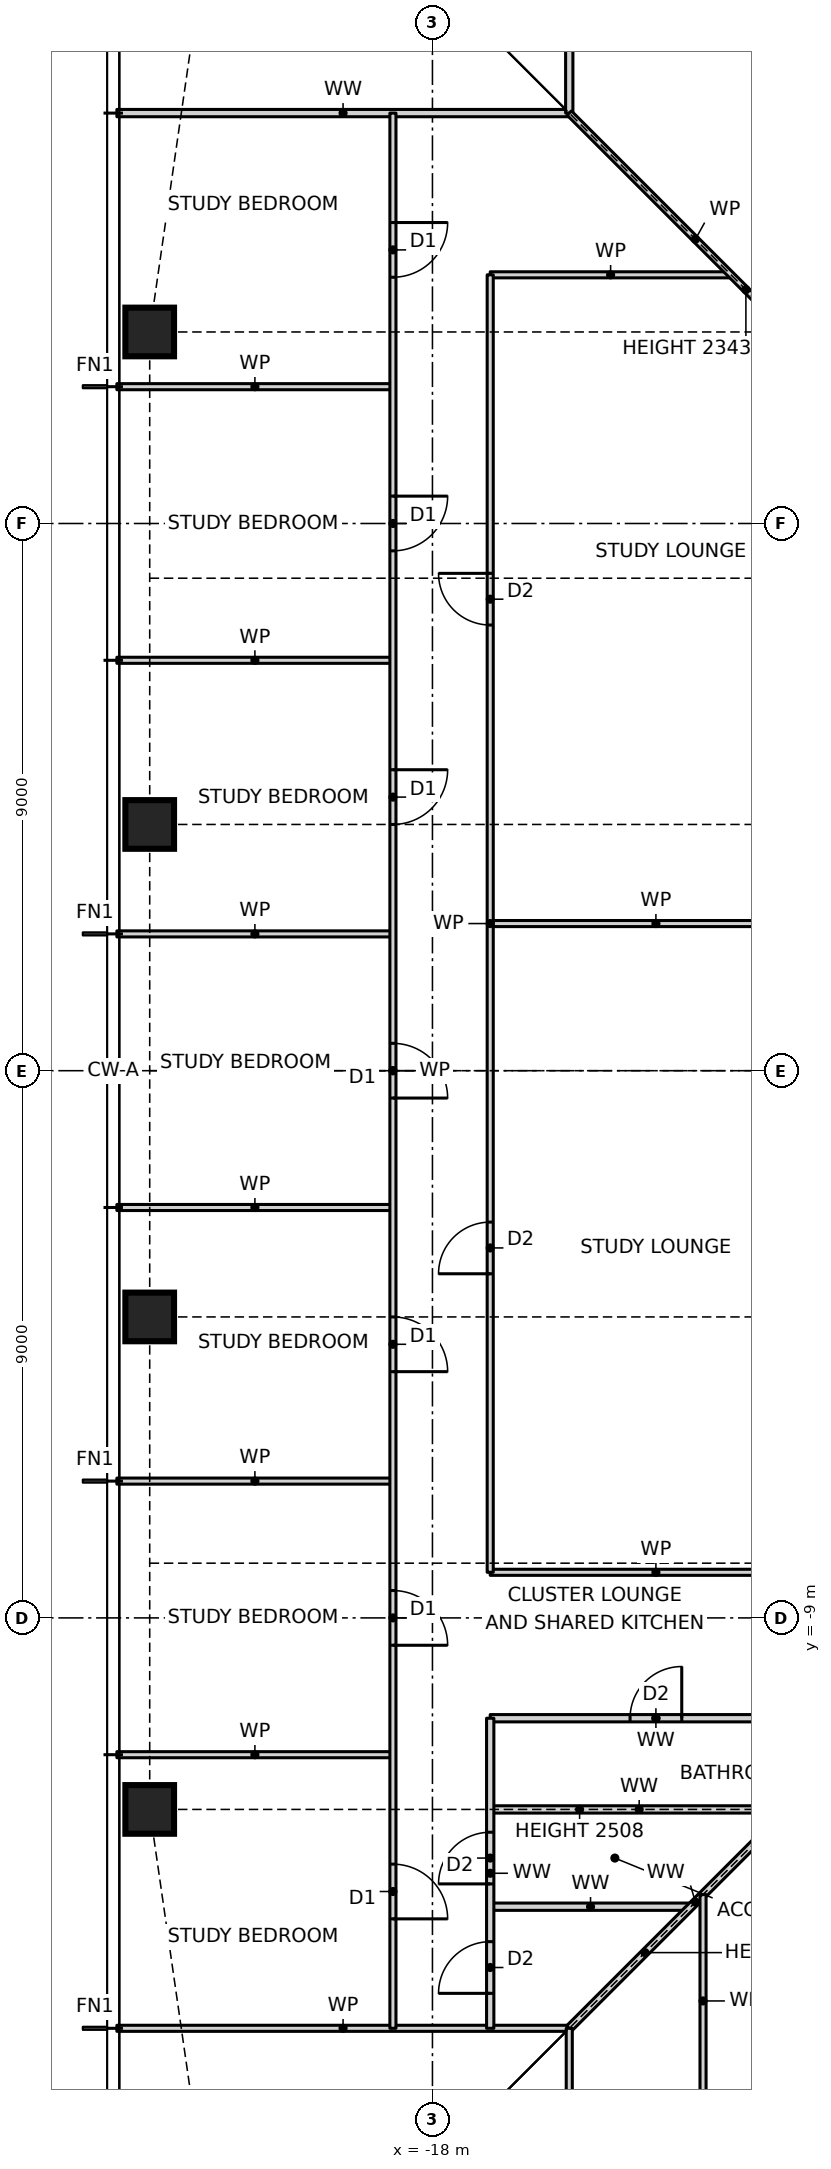
"""IFC4 building model, lengths in metres.
Left out: names, types, materials, properties, quantities, classifications, styles, units other than length and angle.
Written with IfcOpenShell. Run it as: python <this file> out.ifc"""

import sys

from ifc_helpers import new_model, si_unit, direction, frame, frame_2d, origin, origin_2d, place, context, subcontext, project, spatial, rectangle, hollow_rectangle, extrude, element, fill, save


model = new_model("IFC4")
c1 = context("Model", 3, precision=1e-05, world=origin(), true_north=direction((0.0, 1.0)))
c2 = subcontext(c1, "Body", "Model", "MODEL_VIEW")
j1 = project(units=[si_unit("LENGTHUNIT", "METRE"), si_unit("PLANEANGLEUNIT", "RADIAN")], contexts=[c1])
p1 = place(None, origin())
s1 = spatial("IfcSite", under=j1, at=p1, CompositionType="ELEMENT")
p2 = place(p1, origin())
s2 = spatial("IfcBuilding", under=s1, at=p2, CompositionType="ELEMENT")
p3 = place(p2, frame((0.0, 0.0, 32.5)))
s3 = spatial("IfcBuildingStorey", under=s2, at=p3, CompositionType="ELEMENT", Elevation=32.5)
for number, where, z_axis, x_axis in (
    (1, (-22.65, 12.15, 0.0), (0.0, 0.0, 1.0), (1.0, 0.0, 0.0)),
    (2, (-22.65, 4.05, 0.0), (0.0, 0.0, 1.0), (1.0, 0.0, 0.0)),
    (3, (-22.65, -4.05, 0.0), (0.0, 0.0, 1.0), (1.0, 0.0, 0.0)),
    (4, (-22.65, -12.15, 0.0), (0.0, 0.0, 1.0), (1.0, 0.0, 0.0)),
):
    element("IfcColumn", number, at=place(p3, frame(where, z_axis=z_axis, x_axis=x_axis)), inside=s3, PredefinedType="COLUMN", context=c2, shape_type="SweptSolid", body=[
        extrude(hollow_rectangle(XDim=0.8, YDim=0.8, WallThickness=0.09, at=origin_2d()), origin(), (0.0, 0.0, 1.0), 3.5),
    ])
p4 = place(p3, frame((-23.19, -15.75, 0.0), z_axis=(0.0, 0.0, 1.0), x_axis=(1.0, 0.0, 0.0)))
e5 = element("IfcWall", 5, at=p4, inside=s3, PredefinedType="PARTITIONING", context=c2, shape_type="SweptSolid", body=[
    extrude(rectangle(XDim=7.44, YDim=0.1, at=frame_2d((3.72, 0.0))), origin(), (0.0, 0.0, 1.0), 3.27),
])
p5 = place(p3, frame((-17.05, -13.75, 0.0), z_axis=(0.0, 0.0, 1.0), x_axis=(1.0, 0.0, 0.0)))
e6 = element("IfcWall", 6, at=p5, inside=s3, PredefinedType="PARTITIONING", context=c2, shape_type="SweptSolid", body=[
    extrude(rectangle(XDim=3.3, YDim=0.12, at=frame_2d((1.65, 0.0))), origin(), (0.0, 0.0, 1.0), 3.27),
])
p6 = place(p3, frame((-17.05, -12.15, 0.0), z_axis=(0.0, 0.0, 1.0), x_axis=(1.0, 0.0, 0.0)))
e7 = element("IfcWall", 7, at=p6, inside=s3, PredefinedType="PARTITIONING", context=c2, shape_type="SweptSolid", body=[
    extrude(rectangle(XDim=4.9, YDim=0.12, at=frame_2d((2.45, 0.0))), origin(), (0.0, 0.0, 1.0), 2.508),
])
p7 = place(p3, frame((-23.19, -11.25, 0.0), z_axis=(0.0, 0.0, 1.0), x_axis=(1.0, 0.0, 0.0)))
e8 = element("IfcWall", 8, at=p7, inside=s3, PredefinedType="PARTITIONING", context=c2, shape_type="SweptSolid", body=[
    extrude(rectangle(XDim=4.54, YDim=0.1, at=frame_2d((2.27, 0.0))), origin(), (0.0, 0.0, 1.0), 3.27),
])
p8 = place(p3, frame((-17.05, -10.65, 0.0), z_axis=(0.0, 0.0, 1.0), x_axis=(1.0, 0.0, 0.0)))
e9 = element("IfcWall", 9, at=p8, inside=s3, PredefinedType="PARTITIONING", context=c2, shape_type="SweptSolid", body=[
    extrude(rectangle(XDim=5.45, YDim=0.12, at=frame_2d((2.725, 0.0))), origin(), (0.0, 0.0, 1.0), 3.27),
])
p9 = place(p8, frame((2.3, 0.0, 0.0)))
e10 = element("IfcOpeningElement", 10, at=p9, cuts=e9, PredefinedType="OPENING", context=c2, shape_type="SweptSolid", body=[
    extrude(rectangle(XDim=0.85, YDim=2.1, at=frame_2d((0.425, 1.05))), frame((0.0, 0.07, 0.0), z_axis=(0.0, -1.0, 0.0), x_axis=(1.0, 0.0, 0.0)), (0.0, 0.0, 1.0), 0.14),
])
p10 = place(p3, frame((-17.05, -8.25, 0.0), z_axis=(0.0, 0.0, 1.0), x_axis=(1.0, 0.0, 0.0)))
e11 = element("IfcWall", 11, at=p10, inside=s3, PredefinedType="PARTITIONING", context=c2, shape_type="SweptSolid", body=[
    extrude(rectangle(XDim=5.45, YDim=0.1, at=frame_2d((2.725, 0.0))), origin(), (0.0, 0.0, 1.0), 3.27),
])
for number, where, z_axis, x_axis in (
    (12, (-23.19, -6.75, 0.0), (0.0, 0.0, 1.0), (1.0, 0.0, 0.0)),
    (13, (-23.19, -2.25, 0.0), (0.0, 0.0, 1.0), (1.0, 0.0, 0.0)),
    (14, (-23.19, 2.25, 0.0), (0.0, 0.0, 1.0), (1.0, 0.0, 0.0)),
):
    element("IfcWall", number, at=place(p3, frame(where, z_axis=z_axis, x_axis=x_axis)), inside=s3, PredefinedType="PARTITIONING", context=c2, shape_type="SweptSolid", body=[
        extrude(rectangle(XDim=4.54, YDim=0.1, at=frame_2d((2.27, 0.0))), origin(), (0.0, 0.0, 1.0), 3.27),
    ])
p11 = place(p3, frame((-17.05, 2.42, 0.0), z_axis=(0.0, 0.0, 1.0), x_axis=(1.0, 0.0, 0.0)))
e15 = element("IfcWall", 15, at=p11, inside=s3, PredefinedType="PARTITIONING", context=c2, shape_type="SweptSolid", body=[
    extrude(rectangle(XDim=5.45, YDim=0.1, at=frame_2d((2.725, 0.0))), origin(), (0.0, 0.0, 1.0), 3.27),
])
for number, where, z_axis, x_axis in (
    (16, (-23.19, 6.75, 0.0), (0.0, 0.0, 1.0), (1.0, 0.0, 0.0)),
    (17, (-23.19, 11.25, 0.0), (0.0, 0.0, 1.0), (1.0, 0.0, 0.0)),
):
    element("IfcWall", number, at=place(p3, frame(where, z_axis=z_axis, x_axis=x_axis)), inside=s3, PredefinedType="PARTITIONING", context=c2, shape_type="SweptSolid", body=[
        extrude(rectangle(XDim=4.54, YDim=0.1, at=frame_2d((2.27, 0.0))), origin(), (0.0, 0.0, 1.0), 3.27),
    ])
p12 = place(p3, frame((-17.05, 13.09, 0.0), z_axis=(0.0, 0.0, 1.0), x_axis=(1.0, 0.0, 0.0)))
e18 = element("IfcWall", 18, at=p12, inside=s3, PredefinedType="PARTITIONING", context=c2, shape_type="SweptSolid", body=[
    extrude(rectangle(XDim=3.96, YDim=0.1, at=frame_2d((1.98, 0.0))), origin(), (0.0, 0.0, 1.0), 3.27),
])
p13 = place(p3, frame((-23.19, 15.75, 0.0), z_axis=(0.0, 0.0, 1.0), x_axis=(1.0, 0.0, 0.0)))
e19 = element("IfcWall", 19, at=p13, inside=s3, PredefinedType="PARTITIONING", context=c2, shape_type="SweptSolid", body=[
    extrude(rectangle(XDim=7.44, YDim=0.12, at=frame_2d((3.72, 0.0))), origin(), (0.0, 0.0, 1.0), 3.27),
])
p14 = place(p3, frame((-15.75, -15.75, 0.0), z_axis=(0.0, 0.0, 1.0), x_axis=(0.707106781187, 0.707106781187, 0.0)))
e20 = element("IfcWall", 20, at=p14, inside=s3, PredefinedType="PARTITIONING", context=c2, shape_type="SweptSolid", body=[
    extrude(rectangle(XDim=5.869, YDim=0.12, at=frame_2d((2.935, 0.0))), origin(), (0.0, 0.0, 1.0), 2.343),
])
p15 = place(p3, frame((-13.55, -17.05, 0.0), z_axis=(0.0, 0.0, 1.0), x_axis=(0.0, 1.0, 0.0)))
e21 = element("IfcWall", 21, at=p15, inside=s3, PredefinedType="PARTITIONING", context=c2, shape_type="SweptSolid", body=[
    extrude(rectangle(XDim=3.5, YDim=0.1, at=frame_2d((1.75, 0.0))), origin(), (0.0, 0.0, 1.0), 3.27),
])
p16 = place(p3, frame((-15.75, -23.19, 0.0), z_axis=(0.0, 0.0, 1.0), x_axis=(0.0, 1.0, 0.0)))
e22 = element("IfcWall", 22, at=p16, inside=s3, PredefinedType="PARTITIONING", context=c2, shape_type="SweptSolid", body=[
    extrude(rectangle(XDim=7.44, YDim=0.1, at=frame_2d((3.72, 0.0))), origin(), (0.0, 0.0, 1.0), 3.27),
])
p17 = place(p16, frame((4.915, 0.0, 0.0)))
e23 = element("IfcOpeningElement", 23, at=p17, cuts=e22, PredefinedType="OPENING", context=c2, shape_type="SweptSolid", body=[
    extrude(rectangle(XDim=0.85, YDim=2.1, at=frame_2d((0.425, 1.05))), frame((0.0, 0.06, 0.0), z_axis=(0.0, -1.0, 0.0), x_axis=(1.0, 0.0, 0.0)), (0.0, 0.0, 1.0), 0.12),
])
p18 = place(p3, frame((-15.75, 15.75, 0.0), z_axis=(0.0, 0.0, 1.0), x_axis=(0.0, 1.0, 0.0)))
e24 = element("IfcWall", 24, at=p18, inside=s3, PredefinedType="PARTITIONING", context=c2, shape_type="SweptSolid", body=[
    extrude(rectangle(XDim=7.44, YDim=0.12, at=frame_2d((3.72, 0.0))), origin(), (0.0, 0.0, 1.0), 3.27),
])
p19 = place(p18, frame((1.675, 0.0, 0.0)))
e25 = element("IfcOpeningElement", 25, at=p19, cuts=e24, PredefinedType="OPENING", context=c2, shape_type="SweptSolid", body=[
    extrude(rectangle(XDim=0.85, YDim=2.1, at=frame_2d((0.425, 1.05))), frame((0.0, 0.07, 0.0), z_axis=(0.0, -1.0, 0.0), x_axis=(1.0, 0.0, 0.0)), (0.0, 0.0, 1.0), 0.14),
])
p20 = place(p3, frame((-17.05, -15.75, 0.0), z_axis=(0.0, 0.0, 1.0), x_axis=(0.0, 1.0, 0.0)))
e26 = element("IfcWall", 26, at=p20, inside=s3, PredefinedType="PARTITIONING", context=c2, shape_type="SweptSolid", body=[
    extrude(rectangle(XDim=5.1, YDim=0.12, at=frame_2d((2.55, 0.0))), origin(), (0.0, 0.0, 1.0), 3.27),
])
p21 = place(p20, frame((2.375, 0.0, 0.0)))
e27 = element("IfcOpeningElement", 27, at=p21, cuts=e26, PredefinedType="OPENING", context=c2, shape_type="SweptSolid", body=[
    extrude(rectangle(XDim=0.85, YDim=2.1, at=frame_2d((0.425, 1.05))), frame((0.0, 0.07, 0.0), z_axis=(0.0, -1.0, 0.0), x_axis=(1.0, 0.0, 0.0)), (0.0, 0.0, 1.0), 0.14),
])
p22 = place(p20, frame((0.575, 0.0, 0.0)))
e28 = element("IfcOpeningElement", 28, at=p22, cuts=e26, PredefinedType="OPENING", context=c2, shape_type="SweptSolid", body=[
    extrude(rectangle(XDim=0.85, YDim=2.1, at=frame_2d((0.425, 1.05))), frame((0.0, 0.07, 0.0), z_axis=(0.0, -1.0, 0.0), x_axis=(1.0, 0.0, 0.0)), (0.0, 0.0, 1.0), 0.14),
])
p23 = place(p3, frame((-17.05, -8.25, 0.0), z_axis=(0.0, 0.0, 1.0), x_axis=(0.0, 1.0, 0.0)))
e29 = element("IfcWall", 29, at=p23, inside=s3, PredefinedType="PARTITIONING", context=c2, shape_type="SweptSolid", body=[
    extrude(rectangle(XDim=21.34, YDim=0.1, at=frame_2d((10.67, 0.0))), origin(), (0.0, 0.0, 1.0), 3.27),
])
p24 = place(p23, frame((15.58, 0.0, 0.0)))
e30 = element("IfcOpeningElement", 30, at=p24, cuts=e29, PredefinedType="OPENING", context=c2, shape_type="SweptSolid", body=[
    extrude(rectangle(XDim=0.85, YDim=2.1, at=frame_2d((0.425, 1.05))), frame((0.0, 0.06, 0.0), z_axis=(0.0, -1.0, 0.0), x_axis=(1.0, 0.0, 0.0)), (0.0, 0.0, 1.0), 0.12),
])
p25 = place(p23, frame((4.91, 0.0, 0.0)))
e31 = element("IfcOpeningElement", 31, at=p25, cuts=e29, PredefinedType="OPENING", context=c2, shape_type="SweptSolid", body=[
    extrude(rectangle(XDim=0.85, YDim=2.1, at=frame_2d((0.425, 1.05))), frame((0.0, 0.06, 0.0), z_axis=(0.0, -1.0, 0.0), x_axis=(1.0, 0.0, 0.0)), (0.0, 0.0, 1.0), 0.12),
])
p26 = place(p3, frame((-18.65, -15.75, 0.0), z_axis=(0.0, 0.0, 1.0), x_axis=(0.0, 1.0, 0.0)))
e32 = element("IfcWall", 32, at=p26, inside=s3, PredefinedType="PARTITIONING", context=c2, shape_type="SweptSolid", body=[
    extrude(rectangle(XDim=31.5, YDim=0.1, at=frame_2d((15.75, 0.0))), origin(), (0.0, 0.0, 1.0), 3.27),
])
p27 = place(p26, frame((28.8, 0.0, 0.0)))
e33 = element("IfcOpeningElement", 33, at=p27, cuts=e32, PredefinedType="OPENING", context=c2, shape_type="SweptSolid", body=[
    extrude(rectangle(XDim=0.9, YDim=2.1, at=frame_2d((0.45, 1.05))), frame((0.0, 0.06, 0.0), z_axis=(0.0, -1.0, 0.0), x_axis=(1.0, 0.0, 0.0)), (0.0, 0.0, 1.0), 0.12),
])
p28 = place(p26, frame((24.3, 0.0, 0.0)))
e34 = element("IfcOpeningElement", 34, at=p28, cuts=e32, PredefinedType="OPENING", context=c2, shape_type="SweptSolid", body=[
    extrude(rectangle(XDim=0.9, YDim=2.1, at=frame_2d((0.45, 1.05))), frame((0.0, 0.06, 0.0), z_axis=(0.0, -1.0, 0.0), x_axis=(1.0, 0.0, 0.0)), (0.0, 0.0, 1.0), 0.12),
])
p29 = place(p26, frame((19.8, 0.0, 0.0)))
e35 = element("IfcOpeningElement", 35, at=p29, cuts=e32, PredefinedType="OPENING", context=c2, shape_type="SweptSolid", body=[
    extrude(rectangle(XDim=0.9, YDim=2.1, at=frame_2d((0.45, 1.05))), frame((0.0, 0.06, 0.0), z_axis=(0.0, -1.0, 0.0), x_axis=(1.0, 0.0, 0.0)), (0.0, 0.0, 1.0), 0.12),
])
p30 = place(p26, frame((15.3, 0.0, 0.0)))
e36 = element("IfcOpeningElement", 36, at=p30, cuts=e32, PredefinedType="OPENING", context=c2, shape_type="SweptSolid", body=[
    extrude(rectangle(XDim=0.9, YDim=2.1, at=frame_2d((0.45, 1.05))), frame((0.0, 0.06, 0.0), z_axis=(0.0, -1.0, 0.0), x_axis=(1.0, 0.0, 0.0)), (0.0, 0.0, 1.0), 0.12),
])
p31 = place(p26, frame((10.8, 0.0, 0.0)))
e37 = element("IfcOpeningElement", 37, at=p31, cuts=e32, PredefinedType="OPENING", context=c2, shape_type="SweptSolid", body=[
    extrude(rectangle(XDim=0.9, YDim=2.1, at=frame_2d((0.45, 1.05))), frame((0.0, 0.06, 0.0), z_axis=(0.0, -1.0, 0.0), x_axis=(1.0, 0.0, 0.0)), (0.0, 0.0, 1.0), 0.12),
])
p32 = place(p26, frame((6.3, 0.0, 0.0)))
e38 = element("IfcOpeningElement", 38, at=p32, cuts=e32, PredefinedType="OPENING", context=c2, shape_type="SweptSolid", body=[
    extrude(rectangle(XDim=0.9, YDim=2.1, at=frame_2d((0.45, 1.05))), frame((0.0, 0.06, 0.0), z_axis=(0.0, -1.0, 0.0), x_axis=(1.0, 0.0, 0.0)), (0.0, 0.0, 1.0), 0.12),
])
p33 = place(p26, frame((1.8, 0.0, 0.0)))
e39 = element("IfcOpeningElement", 39, at=p33, cuts=e32, PredefinedType="OPENING", context=c2, shape_type="SweptSolid", body=[
    extrude(rectangle(XDim=0.9, YDim=2.1, at=frame_2d((0.45, 1.05))), frame((0.0, 0.06, 0.0), z_axis=(0.0, -1.0, 0.0), x_axis=(1.0, 0.0, 0.0)), (0.0, 0.0, 1.0), 0.12),
])
p34 = place(p3, frame((-11.6, 11.6, 0.0), z_axis=(0.0, 0.0, 1.0), x_axis=(-0.707106781187, 0.707106781187, 0.0)))
e40 = element("IfcWall", 40, at=p34, inside=s3, PredefinedType="PARTITIONING", context=c2, shape_type="SweptSolid", body=[
    extrude(rectangle(XDim=5.869, YDim=0.1, at=frame_2d((2.935, 0.0))), origin(), (0.0, 0.0, 1.0), 2.343),
])
p35 = place(p27, frame((0.9, 0.0, 0.0), z_axis=(0.0, 0.0, 1.0), x_axis=(-1.0, 0.0, 0.0)))
e41 = element("IfcDoor", 41, at=p35, inside=s3, OperationType="SINGLE_SWING_LEFT", PredefinedType="DOOR", context=c2, shape_type="SweptSolid", body=[
    extrude(rectangle(XDim=0.9, YDim=2.1, at=frame_2d((0.45, 1.05))), frame((0.0, 0.025, 0.0), z_axis=(0.0, -1.0, 0.0), x_axis=(1.0, 0.0, 0.0)), (0.0, 0.0, 1.0), 0.05),
])
fill(e33, e41)
p36 = place(p28, frame((0.9, 0.0, 0.0), z_axis=(0.0, 0.0, 1.0), x_axis=(-1.0, 0.0, 0.0)))
e42 = element("IfcDoor", 42, at=p36, inside=s3, OperationType="SINGLE_SWING_LEFT", PredefinedType="DOOR", context=c2, shape_type="SweptSolid", body=[
    extrude(rectangle(XDim=0.9, YDim=2.1, at=frame_2d((0.45, 1.05))), frame((0.0, 0.025, 0.0), z_axis=(0.0, -1.0, 0.0), x_axis=(1.0, 0.0, 0.0)), (0.0, 0.0, 1.0), 0.05),
])
fill(e34, e42)
p37 = place(p29, frame((0.9, 0.0, 0.0), z_axis=(0.0, 0.0, 1.0), x_axis=(-1.0, 0.0, 0.0)))
e43 = element("IfcDoor", 43, at=p37, inside=s3, OperationType="SINGLE_SWING_LEFT", PredefinedType="DOOR", context=c2, shape_type="SweptSolid", body=[
    extrude(rectangle(XDim=0.9, YDim=2.1, at=frame_2d((0.45, 1.05))), frame((0.0, 0.025, 0.0), z_axis=(0.0, -1.0, 0.0), x_axis=(1.0, 0.0, 0.0)), (0.0, 0.0, 1.0), 0.05),
])
fill(e35, e43)
p38 = place(p30, frame((0.9, 0.0, 0.0), z_axis=(0.0, 0.0, 1.0), x_axis=(-1.0, 0.0, 0.0)))
e44 = element("IfcDoor", 44, at=p38, inside=s3, OperationType="SINGLE_SWING_RIGHT", PredefinedType="DOOR", context=c2, shape_type="SweptSolid", body=[
    extrude(rectangle(XDim=0.9, YDim=2.1, at=frame_2d((0.45, 1.05))), frame((0.0, 0.025, 0.0), z_axis=(0.0, -1.0, 0.0), x_axis=(1.0, 0.0, 0.0)), (0.0, 0.0, 1.0), 0.05),
])
fill(e36, e44)
p39 = place(p31, frame((0.9, 0.0, 0.0), z_axis=(0.0, 0.0, 1.0), x_axis=(-1.0, 0.0, 0.0)))
e45 = element("IfcDoor", 45, at=p39, inside=s3, OperationType="SINGLE_SWING_RIGHT", PredefinedType="DOOR", context=c2, shape_type="SweptSolid", body=[
    extrude(rectangle(XDim=0.9, YDim=2.1, at=frame_2d((0.45, 1.05))), frame((0.0, 0.025, 0.0), z_axis=(0.0, -1.0, 0.0), x_axis=(1.0, 0.0, 0.0)), (0.0, 0.0, 1.0), 0.05),
])
fill(e37, e45)
p40 = place(p32, frame((0.9, 0.0, 0.0), z_axis=(0.0, 0.0, 1.0), x_axis=(-1.0, 0.0, 0.0)))
e46 = element("IfcDoor", 46, at=p40, inside=s3, OperationType="SINGLE_SWING_RIGHT", PredefinedType="DOOR", context=c2, shape_type="SweptSolid", body=[
    extrude(rectangle(XDim=0.9, YDim=2.1, at=frame_2d((0.45, 1.05))), frame((0.0, 0.025, 0.0), z_axis=(0.0, -1.0, 0.0), x_axis=(1.0, 0.0, 0.0)), (0.0, 0.0, 1.0), 0.05),
])
fill(e38, e46)
p41 = place(p33, frame((0.9, 0.0, 0.0), z_axis=(0.0, 0.0, 1.0), x_axis=(-1.0, 0.0, 0.0)))
e47 = element("IfcDoor", 47, at=p41, inside=s3, OperationType="SINGLE_SWING_RIGHT", PredefinedType="DOOR", context=c2, shape_type="SweptSolid", body=[
    extrude(rectangle(XDim=0.9, YDim=2.1, at=frame_2d((0.45, 1.05))), frame((0.0, 0.025, 0.0), z_axis=(0.0, -1.0, 0.0), x_axis=(1.0, 0.0, 0.0)), (0.0, 0.0, 1.0), 0.05),
])
fill(e39, e47)
p42 = place(p24, origin())
e48 = element("IfcDoor", 48, at=p42, inside=s3, OperationType="SINGLE_SWING_RIGHT", PredefinedType="DOOR", context=c2, shape_type="SweptSolid", body=[
    extrude(rectangle(XDim=0.85, YDim=2.1, at=frame_2d((0.425, 1.05))), frame((0.0, 0.025, 0.0), z_axis=(0.0, -1.0, 0.0), x_axis=(1.0, 0.0, 0.0)), (0.0, 0.0, 1.0), 0.05),
])
fill(e30, e48)
p43 = place(p25, origin())
e49 = element("IfcDoor", 49, at=p43, inside=s3, OperationType="SINGLE_SWING_LEFT", PredefinedType="DOOR", context=c2, shape_type="SweptSolid", body=[
    extrude(rectangle(XDim=0.85, YDim=2.1, at=frame_2d((0.425, 1.05))), frame((0.0, 0.025, 0.0), z_axis=(0.0, -1.0, 0.0), x_axis=(1.0, 0.0, 0.0)), (0.0, 0.0, 1.0), 0.05),
])
fill(e31, e49)
p44 = place(p9, origin())
e50 = element("IfcDoor", 50, at=p44, inside=s3, OperationType="SINGLE_SWING_RIGHT", PredefinedType="DOOR", context=c2, shape_type="SweptSolid", body=[
    extrude(rectangle(XDim=0.85, YDim=2.1, at=frame_2d((0.425, 1.05))), frame((0.0, 0.025, 0.0), z_axis=(0.0, -1.0, 0.0), x_axis=(1.0, 0.0, 0.0)), (0.0, 0.0, 1.0), 0.05),
])
fill(e10, e50)
p45 = place(p21, origin())
e51 = element("IfcDoor", 51, at=p45, inside=s3, OperationType="SINGLE_SWING_LEFT", PredefinedType="DOOR", context=c2, shape_type="SweptSolid", body=[
    extrude(rectangle(XDim=0.85, YDim=2.1, at=frame_2d((0.425, 1.05))), frame((0.0, 0.025, 0.0), z_axis=(0.0, -1.0, 0.0), x_axis=(1.0, 0.0, 0.0)), (0.0, 0.0, 1.0), 0.05),
])
fill(e27, e51)
p46 = place(p22, origin())
e52 = element("IfcDoor", 52, at=p46, inside=s3, OperationType="SINGLE_SWING_LEFT", PredefinedType="DOOR", context=c2, shape_type="SweptSolid", body=[
    extrude(rectangle(XDim=0.85, YDim=2.1, at=frame_2d((0.425, 1.05))), frame((0.0, 0.025, 0.0), z_axis=(0.0, -1.0, 0.0), x_axis=(1.0, 0.0, 0.0)), (0.0, 0.0, 1.0), 0.05),
])
fill(e28, e52)
save(model, sys.argv[1])
